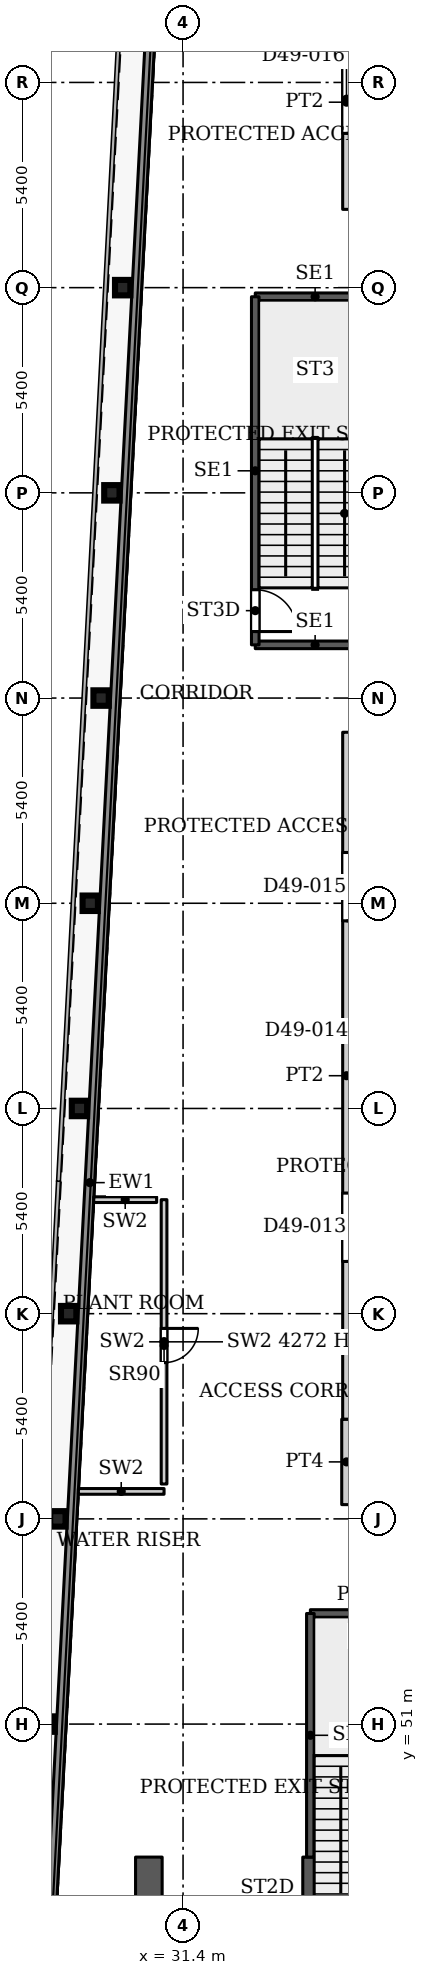
"""IFC4 building model, lengths in metres.
Left out: names, types, materials, properties, quantities, classifications, styles, units other than length and angle.
Written with IfcOpenShell. Run it as: python <this file> out.ifc"""

import sys

from ifc_helpers import new_model, si_unit, direction, frame, frame_2d, origin, origin_2d, place, context, subcontext, project, spatial, rectangle, i_section, extrude, source, transform, mapped, element, fill, save


model = new_model("IFC4")
c1 = context("Model", 3, precision=1e-05, world=origin(), true_north=direction((0.0, 1.0)))
c2 = subcontext(c1, "Body", "Model", "MODEL_VIEW")
j1 = project(units=[si_unit("LENGTHUNIT", "METRE"), si_unit("PLANEANGLEUNIT", "RADIAN")], contexts=[c1])
p1 = place(None, origin())
s1 = spatial("IfcSite", under=j1, at=p1, CompositionType="ELEMENT")
p2 = place(p1, origin())
s2 = spatial("IfcBuilding", under=s1, at=p2, CompositionType="ELEMENT")
p3 = place(p2, frame((0.0, 0.0, 211.1)))
s3 = spatial("IfcBuildingStorey", under=s2, at=p3, CompositionType="ELEMENT", Elevation=211.1)
for number, where, z_axis, x_axis in (
    (1, (27.822, 51.0, 0.0), (0.0, 0.0, 1.0), (1.0, 0.0, 0.0)),
    (2, (28.106, 56.4, 0.0), (0.0, 0.0, 1.0), (1.0, 0.0, 0.0)),
    (3, (28.39, 61.8, 0.0), (0.0, 0.0, 1.0), (1.0, 0.0, 0.0)),
    (4, (28.674, 67.2, 0.0), (0.0, 0.0, 1.0), (1.0, 0.0, 0.0)),
    (5, (28.958, 72.6, 0.0), (0.0, 0.0, 1.0), (1.0, 0.0, 0.0)),
    (6, (29.243, 78.0, 0.0), (0.0, 0.0, 1.0), (1.0, 0.0, 0.0)),
    (7, (29.527, 83.4, 0.0), (0.0, 0.0, 1.0), (1.0, 0.0, 0.0)),
    (8, (29.811, 88.8, 0.0), (0.0, 0.0, 1.0), (1.0, 0.0, 0.0)),
):
    element("IfcColumn", number, at=place(p3, frame(where, z_axis=z_axis, x_axis=x_axis)), inside=s3, PredefinedType="COLUMN", context=c2, shape_type="SweptSolid", body=[
        extrude(i_section(OverallWidth=0.404, OverallDepth=0.407, WebThickness=0.027, FlangeThickness=0.044, FilletRadius=0.012, at=origin_2d()), origin(), (0.0, 0.0, 1.0), 5.1),
    ])
p4 = place(p3, frame((34.75, 29.05, 0.0), z_axis=(0.0, 0.0, 1.0), x_axis=(0.0, 1.0, 0.0)))
e9 = element("IfcWall", 9, at=p4, inside=s3, PredefinedType="SHEAR", context=c2, shape_type="SweptSolid", body=[
    extrude(rectangle(XDim=18.45, YDim=0.4, at=frame_2d((9.225, 0.0))), origin(), (0.0, 0.0, 1.0), 5.1),
])
p5 = place(p4, frame((8.025, 0.0, 0.0)))
e10 = element("IfcOpeningElement", 10, at=p5, cuts=e9, PredefinedType="OPENING", context=c2, shape_type="SweptSolid", body=[
    extrude(rectangle(XDim=1.1, YDim=2.2, at=frame_2d((0.55, 1.1))), frame((0.0, 0.21, 0.0), z_axis=(0.0, -1.0, 0.0), x_axis=(1.0, 0.0, 0.0)), (0.0, 0.0, 1.0), 0.42),
])
p6 = place(p4, frame((10.875, 0.0, 0.0)))
e11 = element("IfcOpeningElement", 11, at=p6, cuts=e9, PredefinedType="OPENING", context=c2, shape_type="SweptSolid", body=[
    extrude(rectangle(XDim=1.1, YDim=2.2, at=frame_2d((0.55, 1.1))), frame((0.0, 0.21, 0.0), z_axis=(0.0, -1.0, 0.0), x_axis=(1.0, 0.0, 0.0)), (0.0, 0.0, 1.0), 0.42),
])
p7 = place(p4, frame((13.725, 0.0, 0.0)))
e12 = element("IfcOpeningElement", 12, at=p7, cuts=e9, PredefinedType="OPENING", context=c2, shape_type="SweptSolid", body=[
    extrude(rectangle(XDim=1.1, YDim=2.2, at=frame_2d((0.55, 1.1))), frame((0.0, 0.21, 0.0), z_axis=(0.0, -1.0, 0.0), x_axis=(1.0, 0.0, 0.0)), (0.0, 0.0, 1.0), 0.42),
])
p8 = place(p4, frame((15.95, 0.0, 0.0)))
e13 = element("IfcOpeningElement", 13, at=p8, cuts=e9, PredefinedType="OPENING", context=c2, shape_type="SweptSolid", body=[
    extrude(rectangle(XDim=1.1, YDim=2.2, at=frame_2d((0.55, 1.1))), frame((0.0, 0.21, 0.0), z_axis=(0.0, -1.0, 0.0), x_axis=(1.0, 0.0, 0.0)), (0.0, 0.0, 1.0), 0.42),
])
p9 = place(p3, frame((30.5, 29.05, 0.0), z_axis=(0.0, 0.0, 1.0), x_axis=(0.0, 1.0, 0.0)))
e14 = element("IfcWall", 14, at=p9, inside=s3, PredefinedType="SHEAR", context=c2, shape_type="SweptSolid", body=[
    extrude(rectangle(XDim=18.45, YDim=0.7, at=frame_2d((9.225, 0.0))), origin(), (0.0, 0.0, 1.0), 5.1),
])
p10 = place(p9, frame((0.944, 0.0, 0.0)))
e15 = element("IfcOpeningElement", 15, at=p10, cuts=e14, PredefinedType="OPENING", context=c2, shape_type="SweptSolid", body=[
    extrude(rectangle(XDim=0.9, YDim=2.2, at=frame_2d((0.45, 1.1))), frame((0.0, 0.36, 0.0), z_axis=(0.0, -1.0, 0.0), x_axis=(1.0, 0.0, 0.0)), (0.0, 0.0, 1.0), 0.72),
])
p11 = place(p9, frame((6.975, 0.0, 0.0)))
e16 = element("IfcOpeningElement", 16, at=p11, cuts=e14, PredefinedType="OPENING", context=c2, shape_type="SweptSolid", body=[
    extrude(rectangle(XDim=0.9, YDim=2.2, at=frame_2d((0.45, 1.1))), frame((0.0, 0.36, 0.0), z_axis=(0.0, -1.0, 0.0), x_axis=(1.0, 0.0, 0.0)), (0.0, 0.0, 1.0), 0.72),
])
p12 = place(p9, frame((11.45, 0.0, 0.0)))
e17 = element("IfcOpeningElement", 17, at=p12, cuts=e14, PredefinedType="OPENING", context=c2, shape_type="SweptSolid", body=[
    extrude(rectangle(XDim=0.9, YDim=2.2, at=frame_2d((0.45, 1.1))), frame((0.0, 0.36, 0.0), z_axis=(0.0, -1.0, 0.0), x_axis=(1.0, 0.0, 0.0)), (0.0, 0.0, 1.0), 0.72),
])
p13 = place(p3, frame((27.195, 31.969, 0.0), z_axis=(0.0, 0.0, 1.0), x_axis=(0.052556141556, 0.99861797099, 0.0)))
e18 = element("IfcWall", 18, at=p13, inside=s3, PredefinedType="SOLIDWALL", context=c2, shape_type="SweptSolid", body=[
    extrude(rectangle(XDim=66.651, YDim=0.25, at=frame_2d((33.326, 0.0))), origin(), (0.0, 0.0, 1.0), 4.95),
])
p14 = place(p3, frame((34.75, 53.91, 0.0), z_axis=(0.0, 0.0, 1.0), x_axis=(1.0, 0.0, 0.0)))
e19 = element("IfcWall", 19, at=p14, inside=s3, PredefinedType="SHEAR", context=c2, shape_type="SweptSolid", body=[
    extrude(rectangle(XDim=3.15, YDim=0.2, at=frame_2d((1.575, 0.0))), origin(), (0.0, 0.0, 1.0), 5.1),
])
p15 = place(p3, frame((34.75, 47.5, 0.0), z_axis=(0.0, 0.0, 1.0), x_axis=(0.0, 1.0, 0.0)))
e20 = element("IfcWall", 20, at=p15, inside=s3, PredefinedType="SHEAR", context=c2, shape_type="SweptSolid", body=[
    extrude(rectangle(XDim=6.41, YDim=0.2, at=frame_2d((3.205, 0.0))), origin(), (0.0, 0.0, 1.0), 5.1),
])
for number, where, z_axis, x_axis in (
    (21, (33.3, 79.4, 0.0), (0.0, 0.0, 1.0), (1.0, 0.0, 0.0)),
    (22, (33.3, 88.56, 0.0), (0.0, 0.0, 1.0), (1.0, 0.0, 0.0)),
):
    element("IfcWall", number, at=place(p3, frame(where, z_axis=z_axis, x_axis=x_axis)), inside=s3, PredefinedType="SHEAR", context=c2, shape_type="SweptSolid", body=[
        extrude(rectangle(XDim=3.15, YDim=0.2, at=frame_2d((1.575, 0.0))), origin(), (0.0, 0.0, 1.0), 5.1),
    ])
p16 = place(p3, frame((33.3, 79.4, 0.0), z_axis=(0.0, 0.0, 1.0), x_axis=(0.0, 1.0, 0.0)))
e23 = element("IfcWall", 23, at=p16, inside=s3, PredefinedType="SHEAR", context=c2, shape_type="SweptSolid", body=[
    extrude(rectangle(XDim=9.16, YDim=0.2, at=frame_2d((4.58, 0.0))), origin(), (0.0, 0.0, 1.0), 5.1),
])
p17 = place(p16, frame((0.35, 0.0, 0.0)))
e24 = element("IfcOpeningElement", 24, at=p17, cuts=e23, PredefinedType="OPENING", context=c2, shape_type="SweptSolid", body=[
    extrude(rectangle(XDim=1.1, YDim=2.2, at=frame_2d((0.55, 1.1))), frame((0.0, 0.11, 0.0), z_axis=(0.0, -1.0, 0.0), x_axis=(1.0, 0.0, 0.0)), (0.0, 0.0, 1.0), 0.22),
])
p18 = place(p3, frame((28.646, 57.123, 0.0), z_axis=(0.0, 0.0, 1.0), x_axis=(1.0, 0.0, 0.0)))
e25 = element("IfcWall", 25, at=p18, inside=s3, PredefinedType="PARTITIONING", context=c2, shape_type="SweptSolid", body=[
    extrude(rectangle(XDim=2.254, YDim=0.15, at=frame_2d((1.127, 0.0))), origin(), (0.0, 0.0, 1.0), 5.1),
])
p19 = place(p3, frame((30.9, 57.318, 0.0), z_axis=(0.0, 0.0, 1.0), x_axis=(0.0, 1.0, 0.0)))
e26 = element("IfcWall", 26, at=p19, inside=s3, PredefinedType="PARTITIONING", context=c2, shape_type="SweptSolid", body=[
    extrude(rectangle(XDim=7.482, YDim=0.15, at=frame_2d((3.741, 0.0))), origin(), (0.0, 0.0, 1.0), 4.272),
])
p20 = place(p19, frame((3.194, 0.0, 0.0)))
e27 = element("IfcOpeningElement", 27, at=p20, cuts=e26, PredefinedType="OPENING", context=c2, shape_type="SweptSolid", body=[
    extrude(rectangle(XDim=0.9, YDim=2.2, at=frame_2d((0.45, 1.1))), frame((0.0, 0.085, 0.0), z_axis=(0.0, -1.0, 0.0), x_axis=(1.0, 0.0, 0.0)), (0.0, 0.0, 1.0), 0.17),
])
p21 = place(p3, frame((29.05, 64.8, 0.0), z_axis=(0.0, 0.0, 1.0), x_axis=(1.0, 0.0, 0.0)))
e28 = element("IfcWall", 28, at=p21, inside=s3, PredefinedType="PARTITIONING", context=c2, shape_type="SweptSolid", body=[
    extrude(rectangle(XDim=1.655, YDim=0.15, at=frame_2d((0.828, 0.0))), origin(), (0.0, 0.0, 1.0), 5.1),
])
p22 = place(p3, frame((35.7, 56.775, 0.0), z_axis=(0.0, 0.0, 1.0), x_axis=(0.0, 1.0, 0.0)))
e29 = element("IfcWall", 29, at=p22, inside=s3, PredefinedType="PARTITIONING", context=c2, shape_type="SweptSolid", body=[
    extrude(rectangle(XDim=2.249, YDim=0.25, at=frame_2d((1.125, 0.0))), origin(), (0.0, 0.0, 1.0), 4.8),
])
p23 = place(p3, frame((35.7, 59.024, 0.0), z_axis=(0.0, 0.0, 1.0), x_axis=(0.0, 1.0, 0.0)))
e30 = element("IfcWall", 30, at=p23, inside=s3, PredefinedType="PARTITIONING", context=c2, shape_type="SweptSolid", body=[
    extrude(rectangle(XDim=18.076, YDim=0.2, at=frame_2d((9.038, 0.0))), origin(), (0.0, 0.0, 1.0), 4.8),
])
p24 = place(p23, frame((4.15, 0.0, 0.0)))
e31 = element("IfcOpeningElement", 31, at=p24, cuts=e30, PredefinedType="OPENING", context=c2, shape_type="SweptSolid", body=[
    extrude(rectangle(XDim=1.8, YDim=2.1, at=frame_2d((0.9, 1.05))), frame((0.0, 0.11, 0.0), z_axis=(0.0, -1.0, 0.0), x_axis=(1.0, 0.0, 0.0)), (0.0, 0.0, 1.0), 0.22),
])
p25 = place(p23, frame((13.112, 0.0, 0.0)))
e32 = element("IfcOpeningElement", 32, at=p25, cuts=e30, PredefinedType="OPENING", context=c2, shape_type="SweptSolid", body=[
    extrude(rectangle(XDim=1.8, YDim=2.1, at=frame_2d((0.9, 1.05))), frame((0.0, 0.11, 0.0), z_axis=(0.0, -1.0, 0.0), x_axis=(1.0, 0.0, 0.0)), (0.0, 0.0, 1.0), 0.22),
])
p26 = place(p3, frame((35.7, 90.86, 0.0), z_axis=(0.0, 0.0, 1.0), x_axis=(0.0, 1.0, 0.0)))
e33 = element("IfcWall", 33, at=p26, inside=s3, PredefinedType="PARTITIONING", context=c2, shape_type="SweptSolid", body=[
    extrude(rectangle(XDim=5.64, YDim=0.2, at=frame_2d((2.82, 0.0))), origin(), (0.0, 0.0, 1.0), 4.8),
])
p27 = place(p26, frame((2.0, 0.0, 0.0)))
e34 = element("IfcOpeningElement", 34, at=p27, cuts=e33, PredefinedType="OPENING", context=c2, shape_type="SweptSolid", body=[
    extrude(rectangle(XDim=1.8, YDim=2.1, at=frame_2d((0.9, 1.05))), frame((0.0, 0.11, 0.0), z_axis=(0.0, -1.0, 0.0), x_axis=(1.0, 0.0, 0.0)), (0.0, 0.0, 1.0), 0.22),
])
m1 = source(origin(), c2, "Body", "SweptSolid", [
    extrude(rectangle(XDim=0.9, YDim=2.2, at=frame_2d((0.45, 1.1))), frame((0.0, 0.025, 0.0), z_axis=(0.0, -1.0, 0.0), x_axis=(1.0, 0.0, 0.0)), (0.0, 0.0, 1.0), 0.05),
])
p28 = place(p20, origin())
e35 = element("IfcDoor", 35, at=p28, inside=s3, OperationType="SINGLE_SWING_RIGHT", PredefinedType="DOOR", context=c2, shape_type="MappedRepresentation", body=[
    mapped(m1, transform((0.0, 0.0, 0.0), x_axis=(1.0, 0.0, 0.0), y_axis=(0.0, 1.0, 0.0), z_axis=(0.0, 0.0, 1.0), scale=1.0)),
])
fill(e27, e35)
m2 = source(origin(), c2, "Body", "SweptSolid", [
    extrude(rectangle(XDim=1.1, YDim=2.2, at=frame_2d((0.55, 1.1))), frame((0.0, 0.025, 0.0), z_axis=(0.0, -1.0, 0.0), x_axis=(1.0, 0.0, 0.0)), (0.0, 0.0, 1.0), 0.05),
])
p29 = place(p17, origin())
e36 = element("IfcDoor", 36, at=p29, inside=s3, OperationType="SINGLE_SWING_RIGHT", PredefinedType="DOOR", context=c2, shape_type="MappedRepresentation", body=[
    mapped(m2, transform((0.0, 0.0, 0.0), x_axis=(1.0, 0.0, 0.0), y_axis=(0.0, 1.0, 0.0), z_axis=(0.0, 0.0, 1.0), scale=1.0)),
])
fill(e24, e36)
m3 = source(origin(), c2, "Body", "SweptSolid", [
    extrude(rectangle(XDim=1.8, YDim=2.1, at=frame_2d((0.9, 1.05))), frame((0.0, 0.025, 0.0), z_axis=(0.0, -1.0, 0.0), x_axis=(1.0, 0.0, 0.0)), (0.0, 0.0, 1.0), 0.05),
])
p30 = place(p24, origin())
e37 = element("IfcDoor", 37, at=p30, inside=s3, OperationType="DOUBLE_DOOR_SINGLE_SWING", PredefinedType="DOOR", context=c2, shape_type="MappedRepresentation", body=[
    mapped(m3, transform((0.0, 0.0, 0.0), x_axis=(1.0, 0.0, 0.0), y_axis=(0.0, 1.0, 0.0), z_axis=(0.0, 0.0, 1.0), scale=1.0)),
])
fill(e31, e37)
p31 = place(p25, origin())
e38 = element("IfcDoor", 38, at=p31, inside=s3, OperationType="DOUBLE_DOOR_SINGLE_SWING", PredefinedType="DOOR", context=c2, shape_type="MappedRepresentation", body=[
    mapped(m3, transform((0.0, 0.0, 0.0), x_axis=(1.0, 0.0, 0.0), y_axis=(0.0, 1.0, 0.0), z_axis=(0.0, 0.0, 1.0), scale=1.0)),
])
fill(e32, e38)
p32 = place(p27, origin())
e39 = element("IfcDoor", 39, at=p32, inside=s3, OperationType="DOUBLE_DOOR_SINGLE_SWING", PredefinedType="DOOR", context=c2, shape_type="MappedRepresentation", body=[
    mapped(m3, transform((0.0, 0.0, 0.0), x_axis=(1.0, 0.0, 0.0), y_axis=(0.0, 1.0, 0.0), z_axis=(0.0, 0.0, 1.0), scale=1.0)),
])
fill(e34, e39)
save(model, sys.argv[1])
